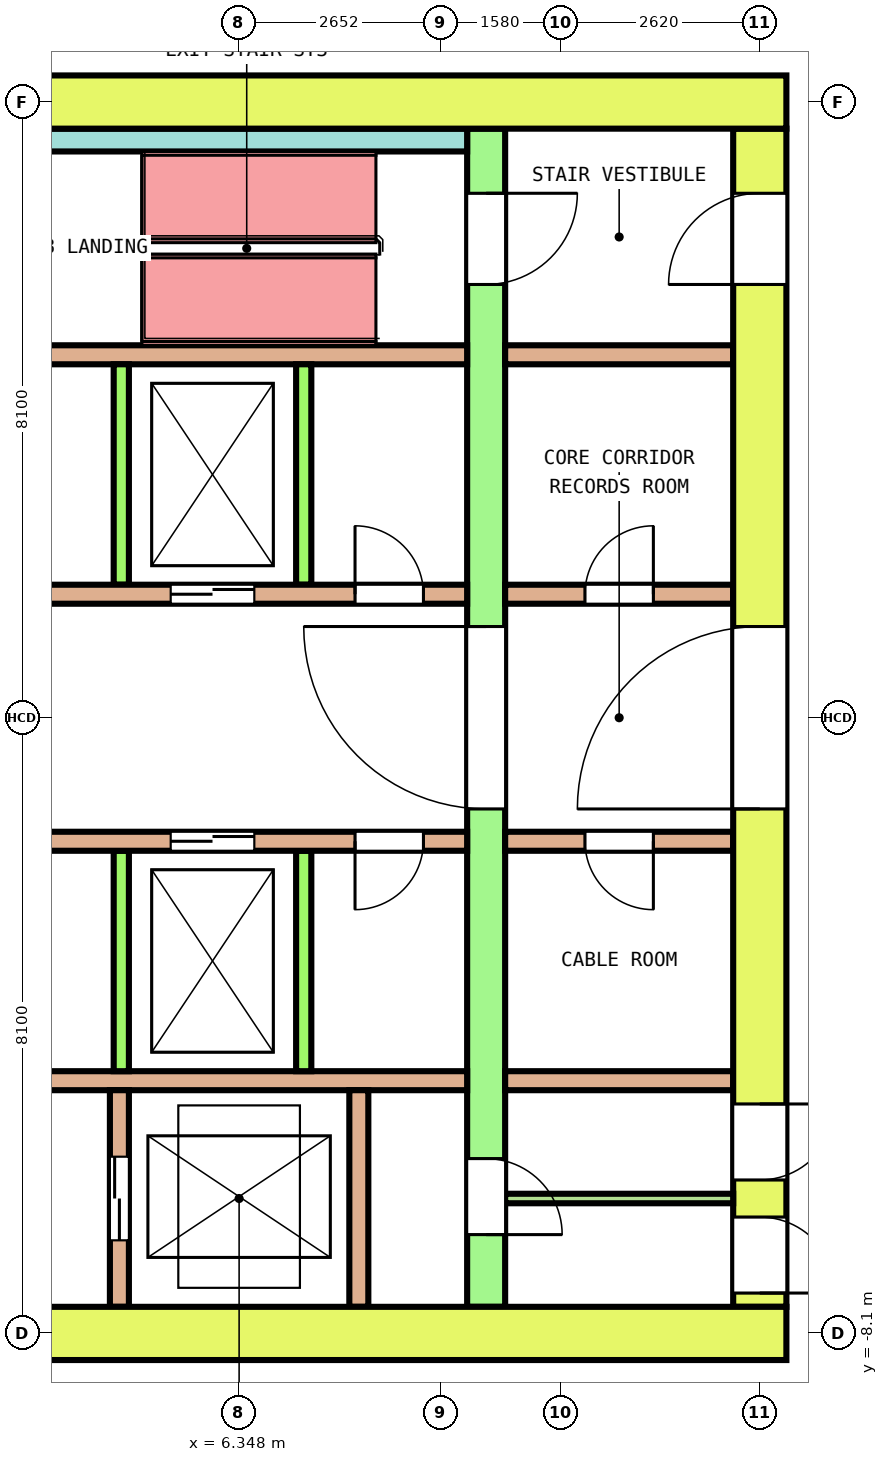
"""IFC4 building model, lengths in metres.
Left out: names, types, materials, properties, quantities, classifications, styles, units other than length and angle.
Written with IfcOpenShell. Run it as: python <this file> out.ifc"""

import sys

from ifc_helpers import new_model, si_unit, direction, frame, frame_2d, origin, place, context, subcontext, project, spatial, rectangle, extrude, element, fill, save


model = new_model("IFC4")
c1 = context("Model", 3, precision=1e-05, world=origin(), true_north=direction((0.0, 1.0)))
c2 = subcontext(c1, "Body", "Model", "MODEL_VIEW")
j1 = project(units=[si_unit("LENGTHUNIT", "METRE"), si_unit("PLANEANGLEUNIT", "RADIAN")], contexts=[c1])
p1 = place(None, origin())
s1 = spatial("IfcSite", under=j1, at=p1, CompositionType="ELEMENT")
p2 = place(p1, origin())
s2 = spatial("IfcBuilding", under=s1, at=p2, CompositionType="ELEMENT")
p3 = place(p2, frame((0.0, 0.0, 149.6)))
s3 = spatial("IfcBuildingStorey", under=s2, at=p3, CompositionType="ELEMENT", Elevation=149.6)
p4 = place(p3, frame((-13.55, 8.1, 0.0), z_axis=(0.0, 0.0, 1.0), x_axis=(1.0, 0.0, 0.0)))
e1 = element("IfcWall", 1, at=p4, inside=s3, PredefinedType="SHEAR", context=c2, shape_type="SweptSolid", body=[
    extrude(rectangle(XDim=27.1, YDim=0.7, at=frame_2d((13.55, 0.0))), origin(), (0.0, 0.0, 1.0), 4.1),
])
p5 = place(p4, frame((14.475, 0.0, 0.0)))
e2 = element("IfcOpeningElement", 2, at=p5, cuts=e1, PredefinedType="OPENING", context=c2, shape_type="SweptSolid", body=[
    extrude(rectangle(XDim=1.4, YDim=2.1, at=frame_2d((0.7, 1.05))), frame((0.0, 0.36, 0.0), z_axis=(0.0, -1.0, 0.0), x_axis=(1.0, 0.0, 0.0)), (0.0, 0.0, 1.0), 0.72),
])
p6 = place(p3, frame((-13.55, -8.1, 0.0), z_axis=(0.0, 0.0, 1.0), x_axis=(1.0, 0.0, 0.0)))
e3 = element("IfcWall", 3, at=p6, inside=s3, PredefinedType="SHEAR", context=c2, shape_type="SweptSolid", body=[
    extrude(rectangle(XDim=27.1, YDim=0.7, at=frame_2d((13.55, 0.0))), origin(), (0.0, 0.0, 1.0), 4.1),
])
p7 = place(p6, frame((15.1, 0.0, 0.0)))
e4 = element("IfcOpeningElement", 4, at=p7, cuts=e3, PredefinedType="OPENING", context=c2, shape_type="SweptSolid", body=[
    extrude(rectangle(XDim=1.2, YDim=2.1, at=frame_2d((0.6, 1.05))), frame((0.0, 0.36, 0.0), z_axis=(0.0, -1.0, 0.0), x_axis=(1.0, 0.0, 0.0)), (0.0, 0.0, 1.0), 0.72),
])
p8 = place(p3, frame((13.2, -7.75, 0.0), z_axis=(0.0, 0.0, 1.0), x_axis=(0.0, 1.0, 0.0)))
e5 = element("IfcWall", 5, at=p8, inside=s3, PredefinedType="SHEAR", context=c2, shape_type="SweptSolid", body=[
    extrude(rectangle(XDim=15.5, YDim=0.7, at=frame_2d((7.75, 0.0))), origin(), (0.0, 0.0, 1.0), 4.1),
])
p9 = place(p8, frame((6.55, 0.0, 0.0)))
e6 = element("IfcOpeningElement", 6, at=p9, cuts=e5, PredefinedType="OPENING", context=c2, shape_type="SweptSolid", body=[
    extrude(rectangle(XDim=2.4, YDim=2.1, at=frame_2d((1.2, 1.05))), frame((0.0, 0.36, 0.0), z_axis=(0.0, -1.0, 0.0), x_axis=(1.0, 0.0, 0.0)), (0.0, 0.0, 1.0), 0.72),
])
p10 = place(p8, frame((13.45, 0.0, 0.0)))
e7 = element("IfcOpeningElement", 7, at=p10, cuts=e5, PredefinedType="OPENING", context=c2, shape_type="SweptSolid", body=[
    extrude(rectangle(XDim=1.2, YDim=2.1, at=frame_2d((0.6, 1.05))), frame((0.0, 0.36, 0.0), z_axis=(0.0, -1.0, 0.0), x_axis=(1.0, 0.0, 0.0)), (0.0, 0.0, 1.0), 0.72),
])
p11 = place(p8, frame((0.181, 0.0, 0.0)))
e8 = element("IfcOpeningElement", 8, at=p11, cuts=e5, PredefinedType="OPENING", context=c2, shape_type="SweptSolid", body=[
    extrude(rectangle(XDim=1.0, YDim=2.1, at=frame_2d((0.5, 1.05))), frame((0.0, 0.36, 0.0), z_axis=(0.0, -1.0, 0.0), x_axis=(1.0, 0.0, 0.0)), (0.0, 0.0, 1.0), 0.72),
])
p12 = place(p8, frame((1.669, 0.0, 0.0)))
e9 = element("IfcOpeningElement", 9, at=p12, cuts=e5, PredefinedType="OPENING", context=c2, shape_type="SweptSolid", body=[
    extrude(rectangle(XDim=1.0, YDim=2.1, at=frame_2d((0.5, 1.05))), frame((0.0, 0.36, 0.0), z_axis=(0.0, -1.0, 0.0), x_axis=(1.0, 0.0, 0.0)), (0.0, 0.0, 1.0), 0.72),
])
p13 = place(p3, frame((9.6, -7.75, 0.0), z_axis=(0.0, 0.0, 1.0), x_axis=(0.0, 1.0, 0.0)))
e10 = element("IfcWall", 10, at=p13, inside=s3, PredefinedType="SHEAR", context=c2, shape_type="SweptSolid", body=[
    extrude(rectangle(XDim=15.5, YDim=0.5, at=frame_2d((7.75, 0.0))), origin(), (0.0, 0.0, 1.0), 4.1),
])
p14 = place(p13, frame((6.55, 0.0, 0.0)))
e11 = element("IfcOpeningElement", 11, at=p14, cuts=e10, PredefinedType="OPENING", context=c2, shape_type="SweptSolid", body=[
    extrude(rectangle(XDim=2.4, YDim=2.1, at=frame_2d((1.2, 1.05))), frame((0.0, 0.26, 0.0), z_axis=(0.0, -1.0, 0.0), x_axis=(1.0, 0.0, 0.0)), (0.0, 0.0, 1.0), 0.52),
])
p15 = place(p13, frame((13.45, 0.0, 0.0)))
e12 = element("IfcOpeningElement", 12, at=p15, cuts=e10, PredefinedType="OPENING", context=c2, shape_type="SweptSolid", body=[
    extrude(rectangle(XDim=1.2, YDim=2.1, at=frame_2d((0.6, 1.05))), frame((0.0, 0.26, 0.0), z_axis=(0.0, -1.0, 0.0), x_axis=(1.0, 0.0, 0.0)), (0.0, 0.0, 1.0), 0.52),
])
p16 = place(p13, frame((0.95, 0.0, 0.0)))
e13 = element("IfcOpeningElement", 13, at=p16, cuts=e10, PredefinedType="OPENING", context=c2, shape_type="SweptSolid", body=[
    extrude(rectangle(XDim=1.0, YDim=2.1, at=frame_2d((0.5, 1.05))), frame((0.0, 0.26, 0.0), z_axis=(0.0, -1.0, 0.0), x_axis=(1.0, 0.0, 0.0)), (0.0, 0.0, 1.0), 0.52),
])
p17 = place(p3, frame((-9.35, 1.625, 0.0), z_axis=(0.0, 0.0, 1.0), x_axis=(1.0, 0.0, 0.0)))
e14 = element("IfcWall", 14, at=p17, inside=s3, PredefinedType="SOLIDWALL", context=c2, shape_type="SweptSolid", body=[
    extrude(rectangle(XDim=18.7, YDim=0.25, at=frame_2d((9.35, 0.0))), origin(), (0.0, 0.0, 1.0), 4.1),
])
p18 = place(p17, frame((2.85, 0.0, 0.0)))
e15 = element("IfcOpeningElement", 15, at=p18, cuts=e14, PredefinedType="OPENING", context=c2, shape_type="SweptSolid", body=[
    extrude(rectangle(XDim=1.1, YDim=2.1, at=frame_2d((0.55, 1.05))), frame((0.0, 0.135, 0.0), z_axis=(0.0, -1.0, 0.0), x_axis=(1.0, 0.0, 0.0)), (0.0, 0.0, 1.0), 0.27),
])
p19 = place(p17, frame((5.15, 0.0, 0.0)))
e16 = element("IfcOpeningElement", 16, at=p19, cuts=e14, PredefinedType="OPENING", context=c2, shape_type="SweptSolid", body=[
    extrude(rectangle(XDim=1.1, YDim=2.1, at=frame_2d((0.55, 1.05))), frame((0.0, 0.135, 0.0), z_axis=(0.0, -1.0, 0.0), x_axis=(1.0, 0.0, 0.0)), (0.0, 0.0, 1.0), 0.27),
])
p20 = place(p17, frame((14.8, 0.0, 0.0)))
e17 = element("IfcOpeningElement", 17, at=p20, cuts=e14, PredefinedType="OPENING", context=c2, shape_type="SweptSolid", body=[
    extrude(rectangle(XDim=1.1, YDim=2.1, at=frame_2d((0.55, 1.05))), frame((0.0, 0.135, 0.0), z_axis=(0.0, -1.0, 0.0), x_axis=(1.0, 0.0, 0.0)), (0.0, 0.0, 1.0), 0.27),
])
p21 = place(p17, frame((0.575, 0.0, 0.0)))
e18 = element("IfcOpeningElement", 18, at=p21, cuts=e14, PredefinedType="OPENING", context=c2, shape_type="SweptSolid", body=[
    extrude(rectangle(XDim=0.9, YDim=2.1, at=frame_2d((0.45, 1.05))), frame((0.0, 0.135, 0.0), z_axis=(0.0, -1.0, 0.0), x_axis=(1.0, 0.0, 0.0)), (0.0, 0.0, 1.0), 0.27),
])
p22 = place(p17, frame((17.225, 0.0, 0.0)))
e19 = element("IfcOpeningElement", 19, at=p22, cuts=e14, PredefinedType="OPENING", context=c2, shape_type="SweptSolid", body=[
    extrude(rectangle(XDim=0.9, YDim=2.1, at=frame_2d((0.45, 1.05))), frame((0.0, 0.135, 0.0), z_axis=(0.0, -1.0, 0.0), x_axis=(1.0, 0.0, 0.0)), (0.0, 0.0, 1.0), 0.27),
])
p23 = place(p3, frame((9.85, 1.625, 0.0), z_axis=(0.0, 0.0, 1.0), x_axis=(1.0, 0.0, 0.0)))
e20 = element("IfcWall", 20, at=p23, inside=s3, PredefinedType="SOLIDWALL", context=c2, shape_type="SweptSolid", body=[
    extrude(rectangle(XDim=3.0, YDim=0.25, at=frame_2d((1.5, 0.0))), origin(), (0.0, 0.0, 1.0), 4.1),
])
p24 = place(p23, frame((1.05, 0.0, 0.0)))
e21 = element("IfcOpeningElement", 21, at=p24, cuts=e20, PredefinedType="OPENING", context=c2, shape_type="SweptSolid", body=[
    extrude(rectangle(XDim=0.9, YDim=2.1, at=frame_2d((0.45, 1.05))), frame((0.0, 0.135, 0.0), z_axis=(0.0, -1.0, 0.0), x_axis=(1.0, 0.0, 0.0)), (0.0, 0.0, 1.0), 0.27),
])
p25 = place(p3, frame((-9.35, 4.775, 0.0), z_axis=(0.0, 0.0, 1.0), x_axis=(1.0, 0.0, 0.0)))
e22 = element("IfcWall", 22, at=p25, inside=s3, PredefinedType="SOLIDWALL", context=c2, shape_type="SweptSolid", body=[
    extrude(rectangle(XDim=18.7, YDim=0.25, at=frame_2d((9.35, 0.0))), origin(), (0.0, 0.0, 1.0), 4.1),
])
p26 = place(p3, frame((9.85, 4.775, 0.0), z_axis=(0.0, 0.0, 1.0), x_axis=(1.0, 0.0, 0.0)))
e23 = element("IfcWall", 23, at=p26, inside=s3, PredefinedType="SOLIDWALL", context=c2, shape_type="SweptSolid", body=[
    extrude(rectangle(XDim=3.0, YDim=0.25, at=frame_2d((1.5, 0.0))), origin(), (0.0, 0.0, 1.0), 4.1),
])
for number, where, z_axis, x_axis in (
    (24, (4.8, 1.75, 0.0), (0.0, 0.0, 1.0), (0.0, 1.0, 0.0)),
    (25, (7.2, 1.75, 0.0), (0.0, 0.0, 1.0), (0.0, 1.0, 0.0)),
):
    element("IfcWall", number, at=place(p3, frame(where, z_axis=z_axis, x_axis=x_axis)), inside=s3, PredefinedType="SOLIDWALL", context=c2, shape_type="SweptSolid", body=[
        extrude(rectangle(XDim=2.9, YDim=0.2, at=frame_2d((1.45, 0.0))), origin(), (0.0, 0.0, 1.0), 4.1),
    ])
p27 = place(p3, frame((-9.35, -1.625, 0.0), z_axis=(0.0, 0.0, 1.0), x_axis=(1.0, 0.0, 0.0)))
e26 = element("IfcWall", 26, at=p27, inside=s3, PredefinedType="SOLIDWALL", context=c2, shape_type="SweptSolid", body=[
    extrude(rectangle(XDim=18.7, YDim=0.25, at=frame_2d((9.35, 0.0))), origin(), (0.0, 0.0, 1.0), 4.1),
])
p28 = place(p27, frame((2.85, 0.0, 0.0)))
e27 = element("IfcOpeningElement", 27, at=p28, cuts=e26, PredefinedType="OPENING", context=c2, shape_type="SweptSolid", body=[
    extrude(rectangle(XDim=1.1, YDim=2.1, at=frame_2d((0.55, 1.05))), frame((0.0, 0.135, 0.0), z_axis=(0.0, -1.0, 0.0), x_axis=(1.0, 0.0, 0.0)), (0.0, 0.0, 1.0), 0.27),
])
p29 = place(p27, frame((5.15, 0.0, 0.0)))
e28 = element("IfcOpeningElement", 28, at=p29, cuts=e26, PredefinedType="OPENING", context=c2, shape_type="SweptSolid", body=[
    extrude(rectangle(XDim=1.1, YDim=2.1, at=frame_2d((0.55, 1.05))), frame((0.0, 0.135, 0.0), z_axis=(0.0, -1.0, 0.0), x_axis=(1.0, 0.0, 0.0)), (0.0, 0.0, 1.0), 0.27),
])
p30 = place(p27, frame((14.8, 0.0, 0.0)))
e29 = element("IfcOpeningElement", 29, at=p30, cuts=e26, PredefinedType="OPENING", context=c2, shape_type="SweptSolid", body=[
    extrude(rectangle(XDim=1.1, YDim=2.1, at=frame_2d((0.55, 1.05))), frame((0.0, 0.135, 0.0), z_axis=(0.0, -1.0, 0.0), x_axis=(1.0, 0.0, 0.0)), (0.0, 0.0, 1.0), 0.27),
])
p31 = place(p27, frame((0.575, 0.0, 0.0)))
e30 = element("IfcOpeningElement", 30, at=p31, cuts=e26, PredefinedType="OPENING", context=c2, shape_type="SweptSolid", body=[
    extrude(rectangle(XDim=0.9, YDim=2.1, at=frame_2d((0.45, 1.05))), frame((0.0, 0.135, 0.0), z_axis=(0.0, -1.0, 0.0), x_axis=(1.0, 0.0, 0.0)), (0.0, 0.0, 1.0), 0.27),
])
p32 = place(p27, frame((17.225, 0.0, 0.0)))
e31 = element("IfcOpeningElement", 31, at=p32, cuts=e26, PredefinedType="OPENING", context=c2, shape_type="SweptSolid", body=[
    extrude(rectangle(XDim=0.9, YDim=2.1, at=frame_2d((0.45, 1.05))), frame((0.0, 0.135, 0.0), z_axis=(0.0, -1.0, 0.0), x_axis=(1.0, 0.0, 0.0)), (0.0, 0.0, 1.0), 0.27),
])
p33 = place(p3, frame((9.85, -1.625, 0.0), z_axis=(0.0, 0.0, 1.0), x_axis=(1.0, 0.0, 0.0)))
e32 = element("IfcWall", 32, at=p33, inside=s3, PredefinedType="SOLIDWALL", context=c2, shape_type="SweptSolid", body=[
    extrude(rectangle(XDim=3.0, YDim=0.25, at=frame_2d((1.5, 0.0))), origin(), (0.0, 0.0, 1.0), 4.1),
])
p34 = place(p33, frame((1.05, 0.0, 0.0)))
e33 = element("IfcOpeningElement", 33, at=p34, cuts=e32, PredefinedType="OPENING", context=c2, shape_type="SweptSolid", body=[
    extrude(rectangle(XDim=0.9, YDim=2.1, at=frame_2d((0.45, 1.05))), frame((0.0, 0.135, 0.0), z_axis=(0.0, -1.0, 0.0), x_axis=(1.0, 0.0, 0.0)), (0.0, 0.0, 1.0), 0.27),
])
p35 = place(p3, frame((-9.35, -4.775, 0.0), z_axis=(0.0, 0.0, 1.0), x_axis=(1.0, 0.0, 0.0)))
e34 = element("IfcWall", 34, at=p35, inside=s3, PredefinedType="SOLIDWALL", context=c2, shape_type="SweptSolid", body=[
    extrude(rectangle(XDim=18.7, YDim=0.25, at=frame_2d((9.35, 0.0))), origin(), (0.0, 0.0, 1.0), 4.1),
])
p36 = place(p3, frame((9.85, -4.775, 0.0), z_axis=(0.0, 0.0, 1.0), x_axis=(1.0, 0.0, 0.0)))
e35 = element("IfcWall", 35, at=p36, inside=s3, PredefinedType="SOLIDWALL", context=c2, shape_type="SweptSolid", body=[
    extrude(rectangle(XDim=3.0, YDim=0.25, at=frame_2d((1.5, 0.0))), origin(), (0.0, 0.0, 1.0), 4.1),
])
for number, where, z_axis, x_axis in (
    (36, (4.8, -4.65, 0.0), (0.0, 0.0, 1.0), (0.0, 1.0, 0.0)),
    (37, (7.2, -4.65, 0.0), (0.0, 0.0, 1.0), (0.0, 1.0, 0.0)),
):
    element("IfcWall", number, at=place(p3, frame(where, z_axis=z_axis, x_axis=x_axis)), inside=s3, PredefinedType="SOLIDWALL", context=c2, shape_type="SweptSolid", body=[
        extrude(rectangle(XDim=2.9, YDim=0.2, at=frame_2d((1.45, 0.0))), origin(), (0.0, 0.0, 1.0), 4.1),
    ])
p37 = place(p3, frame((3.55, 7.6, 0.0), z_axis=(0.0, 0.0, 1.0), x_axis=(1.0, 0.0, 0.0)))
e38 = element("IfcWall", 38, at=p37, inside=s3, PredefinedType="SOLIDWALL", context=c2, shape_type="SweptSolid", body=[
    extrude(rectangle(XDim=5.8, YDim=0.3, at=frame_2d((2.9, 0.0))), origin(), (0.0, 0.0, 1.0), 4.1),
])
p38 = place(p3, frame((4.775, -7.75, 0.0), z_axis=(0.0, 0.0, 1.0), x_axis=(0.0, 1.0, 0.0)))
e39 = element("IfcWall", 39, at=p38, inside=s3, PredefinedType="SOLIDWALL", context=c2, shape_type="SweptSolid", body=[
    extrude(rectangle(XDim=2.85, YDim=0.25, at=frame_2d((1.425, 0.0))), origin(), (0.0, 0.0, 1.0), 4.1),
])
p39 = place(p38, frame((0.875, 0.0, 0.0)))
e40 = element("IfcOpeningElement", 40, at=p39, cuts=e39, PredefinedType="OPENING", context=c2, shape_type="SweptSolid", body=[
    extrude(rectangle(XDim=1.1, YDim=2.1, at=frame_2d((0.55, 1.05))), frame((0.0, 0.135, 0.0), z_axis=(0.0, -1.0, 0.0), x_axis=(1.0, 0.0, 0.0)), (0.0, 0.0, 1.0), 0.27),
])
p40 = place(p3, frame((7.925, -7.75, 0.0), z_axis=(0.0, 0.0, 1.0), x_axis=(0.0, 1.0, 0.0)))
e41 = element("IfcWall", 41, at=p40, inside=s3, PredefinedType="SOLIDWALL", context=c2, shape_type="SweptSolid", body=[
    extrude(rectangle(XDim=2.85, YDim=0.25, at=frame_2d((1.425, 0.0))), origin(), (0.0, 0.0, 1.0), 4.1),
])
p41 = place(p3, frame((9.85, -6.325, 0.0), z_axis=(0.0, 0.0, 1.0), x_axis=(1.0, 0.0, 0.0)))
e42 = element("IfcWall", 42, at=p41, inside=s3, PredefinedType="PARTITIONING", context=c2, shape_type="SweptSolid", body=[
    extrude(rectangle(XDim=3.0, YDim=0.125, at=frame_2d((1.5, 0.0))), origin(), (0.0, 0.0, 1.0), 4.1),
])
p42 = place(p20, origin())
e43 = element("IfcDoor", 43, at=p42, inside=s3, OperationType="DOUBLE_DOOR_SLIDING", PredefinedType="DOOR", context=c2, shape_type="SweptSolid", body=[
    extrude(rectangle(XDim=1.1, YDim=2.1, at=frame_2d((0.55, 1.05))), frame((0.0, 0.075, 0.0), z_axis=(0.0, -1.0, 0.0), x_axis=(1.0, 0.0, 0.0)), (0.0, 0.0, 1.0), 0.15),
])
fill(e17, e43)
p43 = place(p30, origin())
e44 = element("IfcDoor", 44, at=p43, inside=s3, OperationType="DOUBLE_DOOR_SLIDING", PredefinedType="DOOR", context=c2, shape_type="SweptSolid", body=[
    extrude(rectangle(XDim=1.1, YDim=2.1, at=frame_2d((0.55, 1.05))), frame((0.0, 0.075, 0.0), z_axis=(0.0, -1.0, 0.0), x_axis=(1.0, 0.0, 0.0)), (0.0, 0.0, 1.0), 0.15),
])
fill(e29, e44)
p44 = place(p39, origin())
e45 = element("IfcDoor", 45, at=p44, inside=s3, OperationType="DOUBLE_DOOR_SLIDING", PredefinedType="DOOR", context=c2, shape_type="SweptSolid", body=[
    extrude(rectangle(XDim=1.1, YDim=2.1, at=frame_2d((0.55, 1.05))), frame((0.0, 0.075, 0.0), z_axis=(0.0, -1.0, 0.0), x_axis=(1.0, 0.0, 0.0)), (0.0, 0.0, 1.0), 0.15),
])
fill(e40, e45)
p45 = place(p14, origin())
e46 = element("IfcDoor", 46, at=p45, inside=s3, OperationType="DOUBLE_DOOR_SINGLE_SWING", PredefinedType="DOOR", context=c2, shape_type="SweptSolid", body=[
    extrude(rectangle(XDim=2.4, YDim=2.1, at=frame_2d((1.2, 1.05))), frame((0.0, 0.2, 0.0), z_axis=(0.0, -1.0, 0.0), x_axis=(1.0, 0.0, 0.0)), (0.0, 0.0, 1.0), 0.4),
])
fill(e11, e46)
p46 = place(p9, origin())
e47 = element("IfcDoor", 47, at=p46, inside=s3, OperationType="DOUBLE_DOOR_SINGLE_SWING", PredefinedType="DOOR", context=c2, shape_type="SweptSolid", body=[
    extrude(rectangle(XDim=2.4, YDim=2.1, at=frame_2d((1.2, 1.05))), frame((0.0, 0.3, 0.0), z_axis=(0.0, -1.0, 0.0), x_axis=(1.0, 0.0, 0.0)), (0.0, 0.0, 1.0), 0.6),
])
fill(e6, e47)
p47 = place(p15, origin())
e48 = element("IfcDoor", 48, at=p47, inside=s3, OperationType="SINGLE_SWING_LEFT", PredefinedType="DOOR", context=c2, shape_type="SweptSolid", body=[
    extrude(rectangle(XDim=1.2, YDim=2.1, at=frame_2d((0.6, 1.05))), frame((0.0, 0.2, 0.0), z_axis=(0.0, -1.0, 0.0), x_axis=(1.0, 0.0, 0.0)), (0.0, 0.0, 1.0), 0.4),
])
fill(e12, e48)
p48 = place(p10, origin())
e49 = element("IfcDoor", 49, at=p48, inside=s3, OperationType="SINGLE_SWING_RIGHT", PredefinedType="DOOR", context=c2, shape_type="SweptSolid", body=[
    extrude(rectangle(XDim=1.2, YDim=2.1, at=frame_2d((0.6, 1.05))), frame((0.0, 0.3, 0.0), z_axis=(0.0, -1.0, 0.0), x_axis=(1.0, 0.0, 0.0)), (0.0, 0.0, 1.0), 0.6),
])
fill(e7, e49)
p49 = place(p16, origin())
e50 = element("IfcDoor", 50, at=p49, inside=s3, OperationType="SINGLE_SWING_LEFT", PredefinedType="DOOR", context=c2, shape_type="SweptSolid", body=[
    extrude(rectangle(XDim=1.0, YDim=2.1, at=frame_2d((0.5, 1.05))), frame((0.0, 0.2, 0.0), z_axis=(0.0, -1.0, 0.0), x_axis=(1.0, 0.0, 0.0)), (0.0, 0.0, 1.0), 0.4),
])
fill(e13, e50)
p50 = place(p11, origin())
e51 = element("IfcDoor", 51, at=p50, inside=s3, OperationType="SINGLE_SWING_RIGHT", PredefinedType="DOOR", context=c2, shape_type="SweptSolid", body=[
    extrude(rectangle(XDim=1.0, YDim=2.1, at=frame_2d((0.5, 1.05))), frame((0.0, 0.3, 0.0), z_axis=(0.0, -1.0, 0.0), x_axis=(1.0, 0.0, 0.0)), (0.0, 0.0, 1.0), 0.6),
])
fill(e8, e51)
p51 = place(p12, origin())
e52 = element("IfcDoor", 52, at=p51, inside=s3, OperationType="SINGLE_SWING_LEFT", PredefinedType="DOOR", context=c2, shape_type="SweptSolid", body=[
    extrude(rectangle(XDim=1.0, YDim=2.1, at=frame_2d((0.5, 1.05))), frame((0.0, 0.3, 0.0), z_axis=(0.0, -1.0, 0.0), x_axis=(1.0, 0.0, 0.0)), (0.0, 0.0, 1.0), 0.6),
])
fill(e9, e52)
p52 = place(p22, origin())
e53 = element("IfcDoor", 53, at=p52, inside=s3, OperationType="SINGLE_SWING_LEFT", PredefinedType="DOOR", context=c2, shape_type="SweptSolid", body=[
    extrude(rectangle(XDim=0.9, YDim=2.1, at=frame_2d((0.45, 1.05))), frame((0.0, 0.075, 0.0), z_axis=(0.0, -1.0, 0.0), x_axis=(1.0, 0.0, 0.0)), (0.0, 0.0, 1.0), 0.15),
])
fill(e19, e53)
p53 = place(p24, origin())
e54 = element("IfcDoor", 54, at=p53, inside=s3, OperationType="SINGLE_SWING_RIGHT", PredefinedType="DOOR", context=c2, shape_type="SweptSolid", body=[
    extrude(rectangle(XDim=0.9, YDim=2.1, at=frame_2d((0.45, 1.05))), frame((0.0, 0.075, 0.0), z_axis=(0.0, -1.0, 0.0), x_axis=(1.0, 0.0, 0.0)), (0.0, 0.0, 1.0), 0.15),
])
fill(e21, e54)
p54 = place(p32, origin())
e55 = element("IfcDoor", 55, at=p54, inside=s3, OperationType="SINGLE_SWING_RIGHT", PredefinedType="DOOR", context=c2, shape_type="SweptSolid", body=[
    extrude(rectangle(XDim=0.9, YDim=2.1, at=frame_2d((0.45, 1.05))), frame((0.0, 0.075, 0.0), z_axis=(0.0, -1.0, 0.0), x_axis=(1.0, 0.0, 0.0)), (0.0, 0.0, 1.0), 0.15),
])
fill(e31, e55)
p55 = place(p34, origin())
e56 = element("IfcDoor", 56, at=p55, inside=s3, OperationType="SINGLE_SWING_LEFT", PredefinedType="DOOR", context=c2, shape_type="SweptSolid", body=[
    extrude(rectangle(XDim=0.9, YDim=2.1, at=frame_2d((0.45, 1.05))), frame((0.0, 0.075, 0.0), z_axis=(0.0, -1.0, 0.0), x_axis=(1.0, 0.0, 0.0)), (0.0, 0.0, 1.0), 0.15),
])
fill(e33, e56)
save(model, sys.argv[1])
